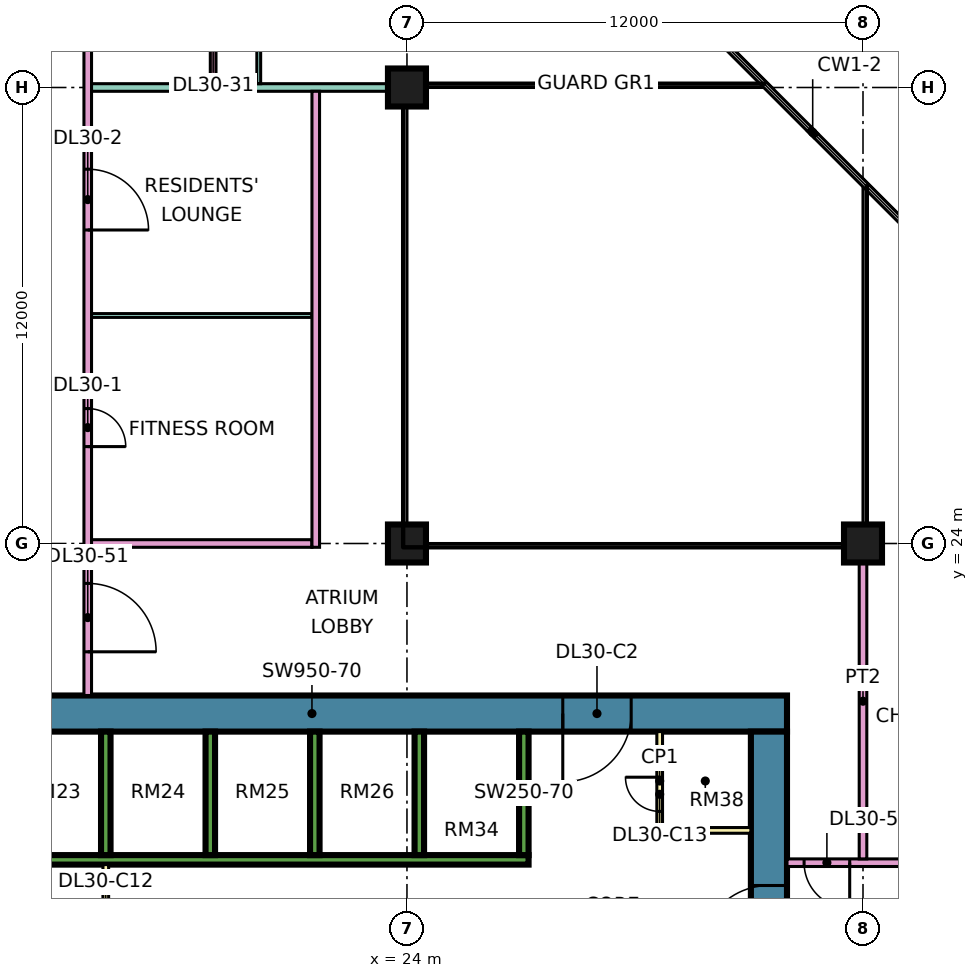
"""IFC4 building model, lengths in metres.
Left out: names, types, materials, properties, quantities, classifications, styles, units other than length and angle.
Written with IfcOpenShell. Run it as: python <this file> out.ifc"""

import sys

from ifc_helpers import new_model, si_unit, direction, frame, frame_2d, origin, origin_2d, place, context, subcontext, project, spatial, rectangle, extrude, element, fill, save


model = new_model("IFC4")
c1 = context("Model", 3, precision=1e-05, world=origin(), true_north=direction((0.0, 1.0)))
c2 = subcontext(c1, "Body", "Model", "MODEL_VIEW")
j1 = project(units=[si_unit("LENGTHUNIT", "METRE"), si_unit("PLANEANGLEUNIT", "RADIAN")], contexts=[c1])
p1 = place(None, origin())
s1 = spatial("IfcSite", under=j1, at=p1, CompositionType="ELEMENT")
p2 = place(p1, origin())
s2 = spatial("IfcBuilding", under=s1, at=p2, CompositionType="ELEMENT")
p3 = place(p2, frame((0.0, 0.0, 129.4)))
s3 = spatial("IfcBuildingStorey", under=s2, at=p3, CompositionType="ELEMENT", Elevation=129.4)
for number, where, z_axis, x_axis in (
    (1, (24.0, 24.0, 0.0), (0.0, 0.0, 1.0), (1.0, 0.0, 0.0)),
    (2, (24.0, 36.0, 0.0), (0.0, 0.0, 1.0), (1.0, 0.0, 0.0)),
    (3, (36.0, 24.0, 0.0), (0.0, 0.0, 1.0), (1.0, 0.0, 0.0)),
):
    element("IfcColumn", number, at=place(p3, frame(where, z_axis=z_axis, x_axis=x_axis)), inside=s3, PredefinedType="COLUMN", context=c2, shape_type="SweptSolid", body=[
        extrude(rectangle(XDim=1.0, YDim=1.0, at=origin_2d()), origin(), (0.0, 0.0, 1.0), 3.75),
    ])
p4 = place(p3, frame((9.0, 19.525, 0.0), z_axis=(0.0, 0.0, 1.0), x_axis=(1.0, 0.0, 0.0)))
e4 = element("IfcWall", 4, at=p4, inside=s3, PredefinedType="SHEAR", context=c2, shape_type="SweptSolid", body=[
    extrude(rectangle(XDim=25.0, YDim=0.95, at=frame_2d((12.5, 0.0))), origin(), (0.0, 0.0, 1.0), 3.75),
])
p5 = place(p4, frame((19.1, 0.0, 0.0)))
e5 = element("IfcOpeningElement", 5, at=p5, cuts=e4, PredefinedType="OPENING", context=c2, shape_type="SweptSolid", body=[
    extrude(rectangle(XDim=1.8, YDim=2.4, at=frame_2d((0.9, 1.2))), frame((0.0, 0.485, 0.0), z_axis=(0.0, -1.0, 0.0), x_axis=(1.0, 0.0, 0.0)), (0.0, 0.0, 1.0), 0.97),
])
p6 = place(p3, frame((33.525, 7.95, 0.0), z_axis=(0.0, 0.0, 1.0), x_axis=(0.0, 1.0, 0.0)))
e6 = element("IfcWall", 6, at=p6, inside=s3, PredefinedType="SHEAR", context=c2, shape_type="SweptSolid", body=[
    extrude(rectangle(XDim=11.1, YDim=0.95, at=frame_2d((5.55, 0.0))), origin(), (0.0, 0.0, 1.0), 3.75),
])
p7 = place(p6, frame((5.25, 0.0, 0.0)))
e7 = element("IfcOpeningElement", 7, at=p7, cuts=e6, PredefinedType="OPENING", context=c2, shape_type="SweptSolid", body=[
    extrude(rectangle(XDim=1.8, YDim=2.4, at=frame_2d((0.9, 1.2))), frame((0.0, 0.485, 0.0), z_axis=(0.0, -1.0, 0.0), x_axis=(1.0, 0.0, 0.0)), (0.0, 0.0, 1.0), 0.97),
])
p8 = place(p3, frame((13.45, 15.675, 0.0), z_axis=(0.0, 0.0, 1.0), x_axis=(1.0, 0.0, 0.0)))
e8 = element("IfcWall", 8, at=p8, inside=s3, PredefinedType="SHEAR", context=c2, shape_type="SweptSolid", body=[
    extrude(rectangle(XDim=13.75, YDim=0.25, at=frame_2d((6.875, 0.0))), origin(), (0.0, 0.0, 1.0), 3.75),
])
for number, where, z_axis, x_axis in (
    (9, (16.075, 15.8, 0.0), (0.0, 0.0, 1.0), (0.0, 1.0, 0.0)),
    (10, (18.825, 15.8, 0.0), (0.0, 0.0, 1.0), (0.0, 1.0, 0.0)),
    (11, (21.575, 15.8, 0.0), (0.0, 0.0, 1.0), (0.0, 1.0, 0.0)),
    (12, (24.325, 15.8, 0.0), (0.0, 0.0, 1.0), (0.0, 1.0, 0.0)),
    (13, (27.075, 15.8, 0.0), (0.0, 0.0, 1.0), (0.0, 1.0, 0.0)),
):
    element("IfcWall", number, at=place(p3, frame(where, z_axis=z_axis, x_axis=x_axis)), inside=s3, PredefinedType="SHEAR", context=c2, shape_type="SweptSolid", body=[
        extrude(rectangle(XDim=3.25, YDim=0.25, at=frame_2d((1.625, 0.0))), origin(), (0.0, 0.0, 1.0), 3.75),
    ])
p9 = place(p3, frame((16.075, 11.45, 0.0), z_axis=(0.0, 0.0, 1.0), x_axis=(0.0, 1.0, 0.0)))
e14 = element("IfcWall", 14, at=p9, inside=s3, PredefinedType="PARTITIONING", context=c2, shape_type="SweptSolid", body=[
    extrude(rectangle(XDim=4.1, YDim=0.15, at=frame_2d((2.05, 0.0))), origin(), (0.0, 0.0, 1.0), 3.35),
])
p10 = place(p9, frame((1.15, 0.0, 0.0)))
e15 = element("IfcOpeningElement", 15, at=p10, cuts=e14, PredefinedType="OPENING", context=c2, shape_type="SweptSolid", body=[
    extrude(rectangle(XDim=1.8, YDim=2.4, at=frame_2d((0.9, 1.2))), frame((0.0, 0.085, 0.0), z_axis=(0.0, -1.0, 0.0), x_axis=(1.0, 0.0, 0.0)), (0.0, 0.0, 1.0), 0.17),
])
p11 = place(p3, frame((30.65, 16.45, 0.0), z_axis=(0.0, 0.0, 1.0), x_axis=(0.0, 1.0, 0.0)))
e16 = element("IfcWall", 16, at=p11, inside=s3, PredefinedType="PARTITIONING", context=c2, shape_type="SweptSolid", body=[
    extrude(rectangle(XDim=2.6, YDim=0.15, at=frame_2d((1.3, 0.0))), origin(), (0.0, 0.0, 1.0), 3.35),
])
p12 = place(p11, frame((0.5, 0.0, 0.0)))
e17 = element("IfcOpeningElement", 17, at=p12, cuts=e16, PredefinedType="OPENING", context=c2, shape_type="SweptSolid", body=[
    extrude(rectangle(XDim=0.9, YDim=2.1, at=frame_2d((0.45, 1.05))), frame((0.0, 0.085, 0.0), z_axis=(0.0, -1.0, 0.0), x_axis=(1.0, 0.0, 0.0)), (0.0, 0.0, 1.0), 0.17),
])
p13 = place(p3, frame((30.65, 16.45, 0.0), z_axis=(0.0, 0.0, 1.0), x_axis=(1.0, 0.0, 0.0)))
e18 = element("IfcWall", 18, at=p13, inside=s3, PredefinedType="PARTITIONING", context=c2, shape_type="SweptSolid", body=[
    extrude(rectangle(XDim=2.4, YDim=0.15, at=frame_2d((1.2, 0.0))), origin(), (0.0, 0.0, 1.0), 3.35),
])
p14 = place(p3, frame((15.6, 20.0, 0.0), z_axis=(0.0, 0.0, 1.0), x_axis=(0.0, 1.0, 0.0)))
e19 = element("IfcWall", 19, at=p14, inside=s3, PredefinedType="PARTITIONING", context=c2, shape_type="SweptSolid", body=[
    extrude(rectangle(XDim=27.775, YDim=0.2, at=frame_2d((13.887, 0.0))), origin(), (0.0, 0.0, 1.0), 3.35),
])
p15 = place(p14, frame((6.55, 0.0, 0.0)))
e20 = element("IfcOpeningElement", 20, at=p15, cuts=e19, PredefinedType="OPENING", context=c2, shape_type="SweptSolid", body=[
    extrude(rectangle(XDim=1.0, YDim=2.1, at=frame_2d((0.5, 1.05))), frame((0.0, 0.11, 0.0), z_axis=(0.0, -1.0, 0.0), x_axis=(1.0, 0.0, 0.0)), (0.0, 0.0, 1.0), 0.22),
])
p16 = place(p14, frame((12.25, 0.0, 0.0)))
e21 = element("IfcOpeningElement", 21, at=p16, cuts=e19, PredefinedType="OPENING", context=c2, shape_type="SweptSolid", body=[
    extrude(rectangle(XDim=1.6, YDim=2.1, at=frame_2d((0.8, 1.05))), frame((0.0, 0.11, 0.0), z_axis=(0.0, -1.0, 0.0), x_axis=(1.0, 0.0, 0.0)), (0.0, 0.0, 1.0), 0.22),
])
p17 = place(p14, frame((23.35, 0.0, 0.0)))
e22 = element("IfcOpeningElement", 22, at=p17, cuts=e19, PredefinedType="OPENING", context=c2, shape_type="SweptSolid", body=[
    extrude(rectangle(XDim=1.0, YDim=2.1, at=frame_2d((0.5, 1.05))), frame((0.0, 0.11, 0.0), z_axis=(0.0, -1.0, 0.0), x_axis=(1.0, 0.0, 0.0)), (0.0, 0.0, 1.0), 0.22),
])
p18 = place(p14, frame((1.15, 0.0, 0.0)))
e23 = element("IfcOpeningElement", 23, at=p18, cuts=e19, PredefinedType="OPENING", context=c2, shape_type="SweptSolid", body=[
    extrude(rectangle(XDim=1.8, YDim=2.1, at=frame_2d((0.9, 1.05))), frame((0.0, 0.11, 0.0), z_axis=(0.0, -1.0, 0.0), x_axis=(1.0, 0.0, 0.0)), (0.0, 0.0, 1.0), 0.22),
])
p19 = place(p14, frame((25.9, 0.0, 0.0)))
e24 = element("IfcOpeningElement", 24, at=p19, cuts=e19, PredefinedType="OPENING", context=c2, shape_type="SweptSolid", body=[
    extrude(rectangle(XDim=1.0, YDim=2.1, at=frame_2d((0.5, 1.05))), frame((0.0, 0.11, 0.0), z_axis=(0.0, -1.0, 0.0), x_axis=(1.0, 0.0, 0.0)), (0.0, 0.0, 1.0), 0.22),
])
p20 = place(p3, frame((15.7, 24.0, 0.0), z_axis=(0.0, 0.0, 1.0), x_axis=(1.0, 0.0, 0.0)))
e25 = element("IfcWall", 25, at=p20, inside=s3, PredefinedType="PARTITIONING", context=c2, shape_type="SweptSolid", body=[
    extrude(rectangle(XDim=5.8, YDim=0.2, at=frame_2d((2.9, 0.0))), origin(), (0.0, 0.0, 1.0), 3.35),
])
p21 = place(p3, frame((15.7, 30.0, 0.0), z_axis=(0.0, 0.0, 1.0), x_axis=(1.0, 0.0, 0.0)))
e26 = element("IfcWall", 26, at=p21, inside=s3, PredefinedType="PARTITIONING", context=c2, shape_type="SweptSolid", body=[
    extrude(rectangle(XDim=5.8, YDim=0.1, at=frame_2d((2.9, 0.0))), origin(), (0.0, 0.0, 1.0), 3.35),
])
p22 = place(p3, frame((15.7, 36.0, 0.0), z_axis=(0.0, 0.0, 1.0), x_axis=(1.0, 0.0, 0.0)))
e27 = element("IfcWall", 27, at=p22, inside=s3, PredefinedType="PARTITIONING", context=c2, shape_type="SweptSolid", body=[
    extrude(rectangle(XDim=8.3, YDim=0.2, at=frame_2d((4.15, 0.0))), origin(), (0.0, 0.0, 1.0), 3.35),
])
p23 = place(p3, frame((18.9, 36.1, 0.0), z_axis=(0.0, 0.0, 1.0), x_axis=(0.0, 1.0, 0.0)))
e28 = element("IfcWall", 28, at=p23, inside=s3, PredefinedType="PARTITIONING", context=c2, shape_type="SweptSolid", body=[
    extrude(rectangle(XDim=6.575, YDim=0.15, at=frame_2d((3.288, 0.0))), origin(), (0.0, 0.0, 1.0), 3.35),
])
p24 = place(p23, frame((1.1, 0.0, 0.0)))
e29 = element("IfcOpeningElement", 29, at=p24, cuts=e28, PredefinedType="OPENING", context=c2, shape_type="SweptSolid", body=[
    extrude(rectangle(XDim=0.9, YDim=2.1, at=frame_2d((0.45, 1.05))), frame((0.0, 0.085, 0.0), z_axis=(0.0, -1.0, 0.0), x_axis=(1.0, 0.0, 0.0)), (0.0, 0.0, 1.0), 0.17),
])
p25 = place(p3, frame((20.1, 36.1, 0.0), z_axis=(0.0, 0.0, 1.0), x_axis=(0.0, 1.0, 0.0)))
e30 = element("IfcWall", 30, at=p25, inside=s3, PredefinedType="PARTITIONING", context=c2, shape_type="SweptSolid", body=[
    extrude(rectangle(XDim=5.95, YDim=0.1, at=frame_2d((2.975, 0.0))), origin(), (0.0, 0.0, 1.0), 3.35),
])
p26 = place(p25, frame((0.95, 0.0, 0.0)))
e31 = element("IfcOpeningElement", 31, at=p26, cuts=e30, PredefinedType="OPENING", context=c2, shape_type="SweptSolid", body=[
    extrude(rectangle(XDim=0.9, YDim=2.1, at=frame_2d((0.45, 1.05))), frame((0.0, 0.06, 0.0), z_axis=(0.0, -1.0, 0.0), x_axis=(1.0, 0.0, 0.0)), (0.0, 0.0, 1.0), 0.12),
])
p27 = place(p25, frame((3.95, 0.0, 0.0)))
e32 = element("IfcOpeningElement", 32, at=p27, cuts=e30, PredefinedType="OPENING", context=c2, shape_type="SweptSolid", body=[
    extrude(rectangle(XDim=0.9, YDim=2.1, at=frame_2d((0.45, 1.05))), frame((0.0, 0.06, 0.0), z_axis=(0.0, -1.0, 0.0), x_axis=(1.0, 0.0, 0.0)), (0.0, 0.0, 1.0), 0.12),
])
p28 = place(p3, frame((21.6, 23.9, 0.0), z_axis=(0.0, 0.0, 1.0), x_axis=(0.0, 1.0, 0.0)))
e33 = element("IfcWall", 33, at=p28, inside=s3, PredefinedType="PARTITIONING", context=c2, shape_type="SweptSolid", body=[
    extrude(rectangle(XDim=12.0, YDim=0.2, at=frame_2d((6.0, 0.0))), origin(), (0.0, 0.0, 1.0), 3.35),
])
p29 = place(p3, frame((34.0, 15.6, 0.0), z_axis=(0.0, 0.0, 1.0), x_axis=(1.0, 0.0, 0.0)))
e34 = element("IfcWall", 34, at=p29, inside=s3, PredefinedType="PARTITIONING", context=c2, shape_type="SweptSolid", body=[
    extrude(rectangle(XDim=10.35, YDim=0.2, at=frame_2d((5.175, 0.0))), origin(), (0.0, 0.0, 1.0), 3.35),
])
p30 = place(p29, frame((5.6, 0.0, 0.0)))
e35 = element("IfcOpeningElement", 35, at=p30, cuts=e34, PredefinedType="OPENING", context=c2, shape_type="SweptSolid", body=[
    extrude(rectangle(XDim=1.0, YDim=2.1, at=frame_2d((0.5, 1.05))), frame((0.0, 0.11, 0.0), z_axis=(0.0, -1.0, 0.0), x_axis=(1.0, 0.0, 0.0)), (0.0, 0.0, 1.0), 0.22),
])
p31 = place(p29, frame((0.45, 0.0, 0.0)))
e36 = element("IfcOpeningElement", 36, at=p31, cuts=e34, PredefinedType="OPENING", context=c2, shape_type="SweptSolid", body=[
    extrude(rectangle(XDim=1.2, YDim=2.1, at=frame_2d((0.6, 1.05))), frame((0.0, 0.11, 0.0), z_axis=(0.0, -1.0, 0.0), x_axis=(1.0, 0.0, 0.0)), (0.0, 0.0, 1.0), 0.22),
])
p32 = place(p3, frame((36.0, 15.7, 0.0), z_axis=(0.0, 0.0, 1.0), x_axis=(0.0, 1.0, 0.0)))
e37 = element("IfcWall", 37, at=p32, inside=s3, PredefinedType="PARTITIONING", context=c2, shape_type="SweptSolid", body=[
    extrude(rectangle(XDim=8.3, YDim=0.2, at=frame_2d((4.15, 0.0))), origin(), (0.0, 0.0, 1.0), 3.35),
])
p33 = place(p7, origin())
e38 = element("IfcDoor", 38, at=p33, inside=s3, OperationType="DOUBLE_DOOR_SINGLE_SWING", PredefinedType="DOOR", context=c2, shape_type="SweptSolid", body=[
    extrude(rectangle(XDim=1.8, YDim=2.4, at=frame_2d((0.9, 1.2))), frame((0.0, 0.025, 0.0), z_axis=(0.0, -1.0, 0.0), x_axis=(1.0, 0.0, 0.0)), (0.0, 0.0, 1.0), 0.05),
])
fill(e7, e38)
p34 = place(p5, frame((1.8, 0.0, 0.0), z_axis=(0.0, 0.0, 1.0), x_axis=(-1.0, 0.0, 0.0)))
e39 = element("IfcDoor", 39, at=p34, inside=s3, OperationType="DOUBLE_DOOR_SINGLE_SWING", PredefinedType="DOOR", context=c2, shape_type="SweptSolid", body=[
    extrude(rectangle(XDim=1.8, YDim=2.4, at=frame_2d((0.9, 1.2))), frame((0.0, 0.025, 0.0), z_axis=(0.0, -1.0, 0.0), x_axis=(1.0, 0.0, 0.0)), (0.0, 0.0, 1.0), 0.05),
])
fill(e5, e39)
p35 = place(p12, frame((0.9, 0.0, 0.0), z_axis=(0.0, 0.0, 1.0), x_axis=(-1.0, 0.0, 0.0)))
e40 = element("IfcDoor", 40, at=p35, inside=s3, OperationType="SINGLE_SWING_RIGHT", PredefinedType="DOOR", context=c2, shape_type="SweptSolid", body=[
    extrude(rectangle(XDim=0.9, YDim=2.1, at=frame_2d((0.45, 1.05))), frame((0.0, 0.025, 0.0), z_axis=(0.0, -1.0, 0.0), x_axis=(1.0, 0.0, 0.0)), (0.0, 0.0, 1.0), 0.05),
])
fill(e17, e40)
p36 = place(p15, frame((1.0, 0.0, 0.0), z_axis=(0.0, 0.0, 1.0), x_axis=(-1.0, 0.0, 0.0)))
e41 = element("IfcDoor", 41, at=p36, inside=s3, OperationType="SINGLE_SWING_LEFT", PredefinedType="DOOR", context=c2, shape_type="SweptSolid", body=[
    extrude(rectangle(XDim=1.0, YDim=2.1, at=frame_2d((0.5, 1.05))), frame((0.0, 0.025, 0.0), z_axis=(0.0, -1.0, 0.0), x_axis=(1.0, 0.0, 0.0)), (0.0, 0.0, 1.0), 0.05),
])
fill(e20, e41)
p37 = place(p16, frame((1.6, 0.0, 0.0), z_axis=(0.0, 0.0, 1.0), x_axis=(-1.0, 0.0, 0.0)))
e42 = element("IfcDoor", 42, at=p37, inside=s3, OperationType="DOUBLE_DOOR_SINGLE_SWING", PredefinedType="DOOR", context=c2, shape_type="SweptSolid", body=[
    extrude(rectangle(XDim=1.6, YDim=2.1, at=frame_2d((0.8, 1.05))), frame((0.0, 0.025, 0.0), z_axis=(0.0, -1.0, 0.0), x_axis=(1.0, 0.0, 0.0)), (0.0, 0.0, 1.0), 0.05),
])
fill(e21, e42)
p38 = place(p31, origin())
e43 = element("IfcDoor", 43, at=p38, inside=s3, OperationType="SINGLE_SWING_RIGHT", PredefinedType="DOOR", context=c2, shape_type="SweptSolid", body=[
    extrude(rectangle(XDim=1.2, YDim=2.1, at=frame_2d((0.6, 1.05))), frame((0.0, 0.025, 0.0), z_axis=(0.0, -1.0, 0.0), x_axis=(1.0, 0.0, 0.0)), (0.0, 0.0, 1.0), 0.05),
])
fill(e36, e43)
p39 = place(p18, frame((1.8, 0.0, 0.0), z_axis=(0.0, 0.0, 1.0), x_axis=(-1.0, 0.0, 0.0)))
e44 = element("IfcDoor", 44, at=p39, inside=s3, OperationType="DOUBLE_DOOR_SINGLE_SWING", PredefinedType="DOOR", context=c2, shape_type="SweptSolid", body=[
    extrude(rectangle(XDim=1.8, YDim=2.1, at=frame_2d((0.9, 1.05))), frame((0.0, 0.025, 0.0), z_axis=(0.0, -1.0, 0.0), x_axis=(1.0, 0.0, 0.0)), (0.0, 0.0, 1.0), 0.05),
])
fill(e23, e44)
save(model, sys.argv[1])
